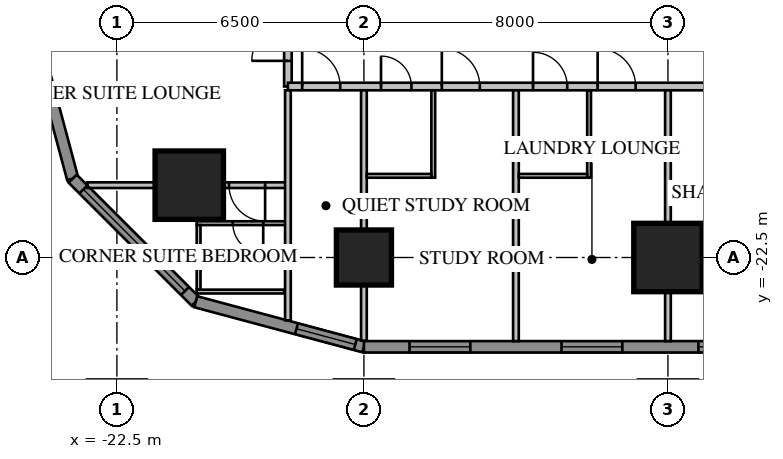
"""IFC4 building model, lengths in metres.
Left out: names, types, materials, properties, quantities, classifications, styles, units other than length and angle.
Written with IfcOpenShell. Run it as: python <this file> out.ifc"""

import sys

from ifc_helpers import new_model, si_unit, direction, frame, frame_2d, origin, origin_2d, place, context, subcontext, project, spatial, rectangle, extrude, element, fill, save


model = new_model("IFC4")
c1 = context("Model", 3, precision=1e-05, world=origin(), true_north=direction((0.0, 1.0)))
c2 = subcontext(c1, "Body", "Model", "MODEL_VIEW")
j1 = project(units=[si_unit("LENGTHUNIT", "METRE"), si_unit("PLANEANGLEUNIT", "RADIAN")], contexts=[c1])
p1 = place(None, origin())
s1 = spatial("IfcSite", under=j1, at=p1, CompositionType="ELEMENT")
p2 = place(p1, origin())
s2 = spatial("IfcBuilding", under=s1, at=p2, CompositionType="ELEMENT")
p3 = place(p2, frame((0.0, 0.0, 23.7)))
s3 = spatial("IfcBuildingStorey", under=s2, at=p3, CompositionType="ELEMENT", Elevation=23.7)
p4 = place(p3, frame((-20.596, -20.596, 0.0), z_axis=(0.0, 0.0, 1.0), x_axis=(1.0, 0.0, 0.0)))
e1 = element("IfcColumn", 1, at=p4, inside=s3, PredefinedType="COLUMN", context=c2, shape_type="SweptSolid", body=[
    extrude(rectangle(XDim=1.8, YDim=1.8, at=origin_2d()), origin(), (0.0, 0.0, 1.0), 3.85),
])
p5 = place(p3, frame((-16.0, -22.5, 0.0), z_axis=(0.0, 0.0, 1.0), x_axis=(1.0, 0.0, 0.0)))
e2 = element("IfcColumn", 2, at=p5, inside=s3, PredefinedType="COLUMN", context=c2, shape_type="SweptSolid", body=[
    extrude(rectangle(XDim=1.45, YDim=1.45, at=origin_2d()), origin(), (0.0, 0.0, 1.0), 3.85),
])
p6 = place(p3, frame((-8.0, -22.5, 0.0), z_axis=(0.0, 0.0, 1.0), x_axis=(1.0, 0.0, 0.0)))
e3 = element("IfcColumn", 3, at=p6, inside=s3, PredefinedType="COLUMN", context=c2, shape_type="SweptSolid", body=[
    extrude(rectangle(XDim=1.8, YDim=1.8, at=origin_2d()), origin(), (0.0, 0.0, 1.0), 3.85),
])
p7 = place(p3, frame((-24.85, -16.0, 0.0), z_axis=(0.0, 0.0, 1.0), x_axis=(0.258839972501, -0.965920218567, 0.0)))
e4 = element("IfcWall", 4, at=p7, inside=s3, PredefinedType="SOLIDWALL", context=c2, shape_type="SweptSolid", body=[
    extrude(rectangle(XDim=4.581, YDim=0.3, at=frame_2d((2.291, 0.0))), origin(), (0.0, 0.0, 1.0), 3.65),
])
p8 = place(p3, frame((-23.664, -20.425, 0.0), z_axis=(0.0, 0.0, 1.0), x_axis=(0.707106781187, -0.707106781187, 0.0)))
e5 = element("IfcWall", 5, at=p8, inside=s3, PredefinedType="SOLIDWALL", context=c2, shape_type="SweptSolid", body=[
    extrude(rectangle(XDim=4.581, YDim=0.3, at=frame_2d((2.291, 0.0))), origin(), (0.0, 0.0, 1.0), 3.65),
])
p9 = place(p8, frame((0.4, 0.0, 0.75)))
e6 = element("IfcOpeningElement", 6, at=p9, cuts=e5, PredefinedType="OPENING", context=c2, shape_type="SweptSolid", body=[
    extrude(rectangle(XDim=3.781, YDim=1.8, at=frame_2d((1.891, 0.9))), frame((0.0, 0.17, 0.0), z_axis=(0.0, -1.0, 0.0), x_axis=(1.0, 0.0, 0.0)), (0.0, 0.0, 1.0), 0.34),
])
p10 = place(p3, frame((-20.425, -23.664, 0.0), z_axis=(0.0, 0.0, 1.0), x_axis=(0.965920218567, -0.258839972501, 0.0)))
e7 = element("IfcWall", 7, at=p10, inside=s3, PredefinedType="SOLIDWALL", context=c2, shape_type="SweptSolid", body=[
    extrude(rectangle(XDim=4.581, YDim=0.3, at=frame_2d((2.291, 0.0))), origin(), (0.0, 0.0, 1.0), 3.65),
])
p11 = place(p10, frame((2.746, 0.0, 0.75)))
e8 = element("IfcOpeningElement", 8, at=p11, cuts=e7, PredefinedType="OPENING", context=c2, shape_type="SweptSolid", body=[
    extrude(rectangle(XDim=1.6, YDim=1.8, at=frame_2d((0.8, 0.9))), frame((0.0, 0.17, 0.0), z_axis=(0.0, -1.0, 0.0), x_axis=(1.0, 0.0, 0.0)), (0.0, 0.0, 1.0), 0.34),
])
p12 = place(p3, frame((-16.0, -24.85, 0.0), z_axis=(0.0, 0.0, 1.0), x_axis=(1.0, 0.0, 0.0)))
e9 = element("IfcWall", 9, at=p12, inside=s3, PredefinedType="SOLIDWALL", context=c2, shape_type="SweptSolid", body=[
    extrude(rectangle(XDim=32.0, YDim=0.3, at=frame_2d((16.0, 0.0))), origin(), (0.0, 0.0, 1.0), 3.65),
])
p13 = place(p12, frame((1.2, 0.0, 0.75)))
e10 = element("IfcOpeningElement", 10, at=p13, cuts=e9, PredefinedType="OPENING", context=c2, shape_type="SweptSolid", body=[
    extrude(rectangle(XDim=1.6, YDim=1.8, at=frame_2d((0.8, 0.9))), frame((0.0, 0.17, 0.0), z_axis=(0.0, -1.0, 0.0), x_axis=(1.0, 0.0, 0.0)), (0.0, 0.0, 1.0), 0.34),
])
p14 = place(p12, frame((5.2, 0.0, 0.75)))
e11 = element("IfcOpeningElement", 11, at=p14, cuts=e9, PredefinedType="OPENING", context=c2, shape_type="SweptSolid", body=[
    extrude(rectangle(XDim=1.6, YDim=1.8, at=frame_2d((0.8, 0.9))), frame((0.0, 0.17, 0.0), z_axis=(0.0, -1.0, 0.0), x_axis=(1.0, 0.0, 0.0)), (0.0, 0.0, 1.0), 0.34),
])
p15 = place(p12, frame((17.2, 0.0, 0.75)))
e12 = element("IfcOpeningElement", 12, at=p15, cuts=e9, PredefinedType="OPENING", context=c2, shape_type="SweptSolid", body=[
    extrude(rectangle(XDim=1.6, YDim=1.8, at=frame_2d((0.8, 0.9))), frame((0.0, 0.17, 0.0), z_axis=(0.0, -1.0, 0.0), x_axis=(1.0, 0.0, 0.0)), (0.0, 0.0, 1.0), 0.34),
])
p16 = place(p12, frame((21.2, 0.0, 0.75)))
e13 = element("IfcOpeningElement", 13, at=p16, cuts=e9, PredefinedType="OPENING", context=c2, shape_type="SweptSolid", body=[
    extrude(rectangle(XDim=1.6, YDim=1.8, at=frame_2d((0.8, 0.9))), frame((0.0, 0.17, 0.0), z_axis=(0.0, -1.0, 0.0), x_axis=(1.0, 0.0, 0.0)), (0.0, 0.0, 1.0), 0.34),
])
p17 = place(p12, frame((25.2, 0.0, 0.75)))
e14 = element("IfcOpeningElement", 14, at=p17, cuts=e9, PredefinedType="OPENING", context=c2, shape_type="SweptSolid", body=[
    extrude(rectangle(XDim=1.6, YDim=1.8, at=frame_2d((0.8, 0.9))), frame((0.0, 0.17, 0.0), z_axis=(0.0, -1.0, 0.0), x_axis=(1.0, 0.0, 0.0)), (0.0, 0.0, 1.0), 0.34),
])
p18 = place(p12, frame((29.2, 0.0, 0.75)))
e15 = element("IfcOpeningElement", 15, at=p18, cuts=e9, PredefinedType="OPENING", context=c2, shape_type="SweptSolid", body=[
    extrude(rectangle(XDim=1.6, YDim=1.8, at=frame_2d((0.8, 0.9))), frame((0.0, 0.17, 0.0), z_axis=(0.0, -1.0, 0.0), x_axis=(1.0, 0.0, 0.0)), (0.0, 0.0, 1.0), 0.34),
])
p19 = place(p12, frame((8.8, 0.0, 0.75)))
e16 = element("IfcOpeningElement", 16, at=p19, cuts=e9, PredefinedType="OPENING", context=c2, shape_type="SweptSolid", body=[
    extrude(rectangle(XDim=2.4, YDim=1.8, at=frame_2d((1.2, 0.9))), frame((0.0, 0.17, 0.0), z_axis=(0.0, -1.0, 0.0), x_axis=(1.0, 0.0, 0.0)), (0.0, 0.0, 1.0), 0.34),
])
p20 = place(p12, frame((13.812, 0.0, 0.0)))
e17 = element("IfcOpeningElement", 17, at=p20, cuts=e9, PredefinedType="OPENING", context=c2, shape_type="SweptSolid", body=[
    extrude(rectangle(XDim=1.0, YDim=2.4, at=frame_2d((0.5, 1.2))), frame((0.0, 0.17, 0.0), z_axis=(0.0, -1.0, 0.0), x_axis=(1.0, 0.0, 0.0)), (0.0, 0.0, 1.0), 0.34),
])
p21 = place(p3, frame((-18.0, 18.0, 0.0), z_axis=(0.0, 0.0, 1.0), x_axis=(0.0, -1.0, 0.0)))
e18 = element("IfcWall", 18, at=p21, inside=s3, PredefinedType="PARTITIONING", context=c2, shape_type="SweptSolid", body=[
    extrude(rectangle(XDim=36.0, YDim=0.2, at=frame_2d((18.0, 0.0))), origin(), (0.0, 0.0, 1.0), 3.65),
])
p22 = place(p21, frame((10.4, 0.0, 0.0)))
e19 = element("IfcOpeningElement", 19, at=p22, cuts=e18, PredefinedType="OPENING", context=c2, shape_type="SweptSolid", body=[
    extrude(rectangle(XDim=1.0, YDim=2.1, at=frame_2d((0.5, 1.05))), frame((0.0, 0.12, 0.0), z_axis=(0.0, -1.0, 0.0), x_axis=(1.0, 0.0, 0.0)), (0.0, 0.0, 1.0), 0.24),
])
p23 = place(p21, frame((14.4, 0.0, 0.0)))
e20 = element("IfcOpeningElement", 20, at=p23, cuts=e18, PredefinedType="OPENING", context=c2, shape_type="SweptSolid", body=[
    extrude(rectangle(XDim=1.0, YDim=2.1, at=frame_2d((0.5, 1.05))), frame((0.0, 0.12, 0.0), z_axis=(0.0, -1.0, 0.0), x_axis=(1.0, 0.0, 0.0)), (0.0, 0.0, 1.0), 0.24),
])
p24 = place(p21, frame((0.375, 0.0, 0.0)))
e21 = element("IfcOpeningElement", 21, at=p24, cuts=e18, PredefinedType="OPENING", context=c2, shape_type="SweptSolid", body=[
    extrude(rectangle(XDim=1.0, YDim=2.1, at=frame_2d((0.5, 1.05))), frame((0.0, 0.12, 0.0), z_axis=(0.0, -1.0, 0.0), x_axis=(1.0, 0.0, 0.0)), (0.0, 0.0, 1.0), 0.24),
])
p25 = place(p21, frame((34.375, 0.0, 0.0)))
e22 = element("IfcOpeningElement", 22, at=p25, cuts=e18, PredefinedType="OPENING", context=c2, shape_type="SweptSolid", body=[
    extrude(rectangle(XDim=0.95, YDim=2.1, at=frame_2d((0.475, 1.05))), frame((0.0, 0.12, 0.0), z_axis=(0.0, -1.0, 0.0), x_axis=(1.0, 0.0, 0.0)), (0.0, 0.0, 1.0), 0.24),
])
p26 = place(p3, frame((-18.065, -21.596, 0.0), z_axis=(0.0, 0.0, 1.0), x_axis=(-1.0, 0.0, 0.0)))
e23 = element("IfcWall", 23, at=p26, inside=s3, PredefinedType="PARTITIONING", context=c2, shape_type="SweptSolid", body=[
    extrude(rectangle(XDim=2.335, YDim=0.1, at=frame_2d((1.167, 0.0))), origin(), (0.0, 0.0, 1.0), 3.65),
])
p27 = place(p26, frame((0.585, 0.0, 0.0)))
e24 = element("IfcOpeningElement", 24, at=p27, cuts=e23, PredefinedType="OPENING", context=c2, shape_type="SweptSolid", body=[
    extrude(rectangle(XDim=0.8, YDim=2.1, at=frame_2d((0.4, 1.05))), frame((0.0, 0.07, 0.0), z_axis=(0.0, -1.0, 0.0), x_axis=(1.0, 0.0, 0.0)), (0.0, 0.0, 1.0), 0.14),
])
p28 = place(p3, frame((-20.35, -21.646, 0.0), z_axis=(0.0, 0.0, 1.0), x_axis=(0.0, -1.0, 0.0)))
e25 = element("IfcWall", 25, at=p28, inside=s3, PredefinedType="PARTITIONING", context=c2, shape_type="SweptSolid", body=[
    extrude(rectangle(XDim=1.7, YDim=0.1, at=frame_2d((0.85, 0.0))), origin(), (0.0, 0.0, 1.0), 3.65),
])
p29 = place(p3, frame((-18.1, -23.396, 0.0), z_axis=(0.0, 0.0, 1.0), x_axis=(-1.0, 0.0, 0.0)))
e26 = element("IfcWall", 26, at=p29, inside=s3, PredefinedType="PARTITIONING", context=c2, shape_type="SweptSolid", body=[
    extrude(rectangle(XDim=2.3, YDim=0.1, at=frame_2d((1.15, 0.0))), origin(), (0.0, 0.0, 1.0), 3.65),
])
p30 = place(p3, frame((-18.065, -20.596, 0.0), z_axis=(0.0, 0.0, 1.0), x_axis=(-1.0, 0.0, 0.0)))
e27 = element("IfcWall", 27, at=p30, inside=s3, PredefinedType="PARTITIONING", context=c2, shape_type="SweptSolid", body=[
    extrude(rectangle(XDim=5.209, YDim=0.15, at=frame_2d((2.604, 0.0))), origin(), (0.0, 0.0, 1.0), 3.65),
])
p31 = place(p30, frame((0.535, 0.0, 0.0)))
e28 = element("IfcOpeningElement", 28, at=p31, cuts=e27, PredefinedType="OPENING", context=c2, shape_type="SweptSolid", body=[
    extrude(rectangle(XDim=0.95, YDim=2.1, at=frame_2d((0.475, 1.05))), frame((0.0, 0.095, 0.0), z_axis=(0.0, -1.0, 0.0), x_axis=(1.0, 0.0, 0.0)), (0.0, 0.0, 1.0), 0.19),
])
p32 = place(p3, frame((-18.0, -18.0, 0.0), z_axis=(0.0, 0.0, 1.0), x_axis=(1.0, 0.0, 0.0)))
e29 = element("IfcWall", 29, at=p32, inside=s3, PredefinedType="PARTITIONING", context=c2, shape_type="SweptSolid", body=[
    extrude(rectangle(XDim=36.0, YDim=0.2, at=frame_2d((18.0, 0.0))), origin(), (0.0, 0.0, 1.0), 3.65),
])
p33 = place(p32, frame((0.375, 0.0, 0.0)))
e30 = element("IfcOpeningElement", 30, at=p33, cuts=e29, PredefinedType="OPENING", context=c2, shape_type="SweptSolid", body=[
    extrude(rectangle(XDim=1.0, YDim=2.1, at=frame_2d((0.5, 1.05))), frame((0.0, 0.12, 0.0), z_axis=(0.0, -1.0, 0.0), x_axis=(1.0, 0.0, 0.0)), (0.0, 0.0, 1.0), 0.24),
])
p34 = place(p32, frame((2.45, 0.0, 0.0)))
e31 = element("IfcOpeningElement", 31, at=p34, cuts=e29, PredefinedType="OPENING", context=c2, shape_type="SweptSolid", body=[
    extrude(rectangle(XDim=0.8, YDim=2.1, at=frame_2d((0.4, 1.05))), frame((0.0, 0.12, 0.0), z_axis=(0.0, -1.0, 0.0), x_axis=(1.0, 0.0, 0.0)), (0.0, 0.0, 1.0), 0.24),
])
p35 = place(p32, frame((4.05, 0.0, 0.0)))
e32 = element("IfcOpeningElement", 32, at=p35, cuts=e29, PredefinedType="OPENING", context=c2, shape_type="SweptSolid", body=[
    extrude(rectangle(XDim=1.0, YDim=2.1, at=frame_2d((0.5, 1.05))), frame((0.0, 0.12, 0.0), z_axis=(0.0, -1.0, 0.0), x_axis=(1.0, 0.0, 0.0)), (0.0, 0.0, 1.0), 0.24),
])
p36 = place(p32, frame((6.45, 0.0, 0.0)))
e33 = element("IfcOpeningElement", 33, at=p36, cuts=e29, PredefinedType="OPENING", context=c2, shape_type="SweptSolid", body=[
    extrude(rectangle(XDim=0.9, YDim=2.1, at=frame_2d((0.45, 1.05))), frame((0.0, 0.12, 0.0), z_axis=(0.0, -1.0, 0.0), x_axis=(1.0, 0.0, 0.0)), (0.0, 0.0, 1.0), 0.24),
])
p37 = place(p32, frame((8.15, 0.0, 0.0)))
e34 = element("IfcOpeningElement", 34, at=p37, cuts=e29, PredefinedType="OPENING", context=c2, shape_type="SweptSolid", body=[
    extrude(rectangle(XDim=1.0, YDim=2.1, at=frame_2d((0.5, 1.05))), frame((0.0, 0.12, 0.0), z_axis=(0.0, -1.0, 0.0), x_axis=(1.0, 0.0, 0.0)), (0.0, 0.0, 1.0), 0.24),
])
p38 = place(p32, frame((19.8, 0.0, 0.0)))
e35 = element("IfcOpeningElement", 35, at=p38, cuts=e29, PredefinedType="OPENING", context=c2, shape_type="SweptSolid", body=[
    extrude(rectangle(XDim=0.95, YDim=2.1, at=frame_2d((0.475, 1.05))), frame((0.0, 0.12, 0.0), z_axis=(0.0, -1.0, 0.0), x_axis=(1.0, 0.0, 0.0)), (0.0, 0.0, 1.0), 0.24),
])
p39 = place(p32, frame((23.8, 0.0, 0.0)))
e36 = element("IfcOpeningElement", 36, at=p39, cuts=e29, PredefinedType="OPENING", context=c2, shape_type="SweptSolid", body=[
    extrude(rectangle(XDim=0.95, YDim=2.1, at=frame_2d((0.475, 1.05))), frame((0.0, 0.12, 0.0), z_axis=(0.0, -1.0, 0.0), x_axis=(1.0, 0.0, 0.0)), (0.0, 0.0, 1.0), 0.24),
])
p40 = place(p32, frame((27.8, 0.0, 0.0)))
e37 = element("IfcOpeningElement", 37, at=p40, cuts=e29, PredefinedType="OPENING", context=c2, shape_type="SweptSolid", body=[
    extrude(rectangle(XDim=0.95, YDim=2.1, at=frame_2d((0.475, 1.05))), frame((0.0, 0.12, 0.0), z_axis=(0.0, -1.0, 0.0), x_axis=(1.0, 0.0, 0.0)), (0.0, 0.0, 1.0), 0.24),
])
p41 = place(p32, frame((31.8, 0.0, 0.0)))
e38 = element("IfcOpeningElement", 38, at=p41, cuts=e29, PredefinedType="OPENING", context=c2, shape_type="SweptSolid", body=[
    extrude(rectangle(XDim=0.95, YDim=2.1, at=frame_2d((0.475, 1.05))), frame((0.0, 0.12, 0.0), z_axis=(0.0, -1.0, 0.0), x_axis=(1.0, 0.0, 0.0)), (0.0, 0.0, 1.0), 0.24),
])
p42 = place(p32, frame((34.375, 0.0, 0.0)))
e39 = element("IfcOpeningElement", 39, at=p42, cuts=e29, PredefinedType="OPENING", context=c2, shape_type="SweptSolid", body=[
    extrude(rectangle(XDim=0.95, YDim=2.1, at=frame_2d((0.475, 1.05))), frame((0.0, 0.12, 0.0), z_axis=(0.0, -1.0, 0.0), x_axis=(1.0, 0.0, 0.0)), (0.0, 0.0, 1.0), 0.24),
])
p43 = place(p32, frame((11.2, 0.0, 0.0)))
e40 = element("IfcOpeningElement", 40, at=p43, cuts=e29, PredefinedType="OPENING", context=c2, shape_type="SweptSolid", body=[
    extrude(rectangle(XDim=1.0, YDim=2.1, at=frame_2d((0.5, 1.05))), frame((0.0, 0.12, 0.0), z_axis=(0.0, -1.0, 0.0), x_axis=(1.0, 0.0, 0.0)), (0.0, 0.0, 1.0), 0.24),
])
p44 = place(p3, frame((-18.0, -18.1, 0.0), z_axis=(0.0, 0.0, 1.0), x_axis=(0.0, -1.0, 0.0)))
e41 = element("IfcWall", 41, at=p44, inside=s3, PredefinedType="PARTITIONING", context=c2, shape_type="SweptSolid", body=[
    extrude(rectangle(XDim=6.053, YDim=0.15, at=frame_2d((3.027, 0.0))), origin(), (0.0, 0.0, 1.0), 3.65),
])
p45 = place(p3, frame((-16.0, -18.1, 0.0), z_axis=(0.0, 0.0, 1.0), x_axis=(0.0, -1.0, 0.0)))
e42 = element("IfcWall", 42, at=p45, inside=s3, PredefinedType="PARTITIONING", context=c2, shape_type="SweptSolid", body=[
    extrude(rectangle(XDim=6.589, YDim=0.15, at=frame_2d((3.295, 0.0))), origin(), (0.0, 0.0, 1.0), 3.65),
])
for number, where, z_axis, x_axis in (
    (43, (-12.0, -18.1, 0.0), (0.0, 0.0, 1.0), (0.0, -1.0, 0.0)),
    (44, (-8.0, -18.1, 0.0), (0.0, 0.0, 1.0), (0.0, -1.0, 0.0)),
):
    element("IfcWall", number, at=place(p3, frame(where, z_axis=z_axis, x_axis=x_axis)), inside=s3, PredefinedType="PARTITIONING", context=c2, shape_type="SweptSolid", body=[
        extrude(rectangle(XDim=6.6, YDim=0.15, at=frame_2d((3.3, 0.0))), origin(), (0.0, 0.0, 1.0), 3.65),
    ])
p46 = place(p3, frame((-14.175, -18.1, 0.0), z_axis=(0.0, 0.0, 1.0), x_axis=(0.0, -1.0, 0.0)))
e45 = element("IfcWall", 45, at=p46, inside=s3, PredefinedType="PARTITIONING", context=c2, shape_type="SweptSolid", body=[
    extrude(rectangle(XDim=2.3, YDim=0.1, at=frame_2d((1.15, 0.0))), origin(), (0.0, 0.0, 1.0), 3.65),
])
p47 = place(p3, frame((-15.925, -20.35, 0.0), z_axis=(0.0, 0.0, 1.0), x_axis=(1.0, 0.0, 0.0)))
e46 = element("IfcWall", 46, at=p47, inside=s3, PredefinedType="PARTITIONING", context=c2, shape_type="SweptSolid", body=[
    extrude(rectangle(XDim=1.7, YDim=0.1, at=frame_2d((0.85, 0.0))), origin(), (0.0, 0.0, 1.0), 3.65),
])
p48 = place(p3, frame((-10.075, -18.1, 0.0), z_axis=(0.0, 0.0, 1.0), x_axis=(0.0, -1.0, 0.0)))
e47 = element("IfcWall", 47, at=p48, inside=s3, PredefinedType="PARTITIONING", context=c2, shape_type="SweptSolid", body=[
    extrude(rectangle(XDim=2.3, YDim=0.1, at=frame_2d((1.15, 0.0))), origin(), (0.0, 0.0, 1.0), 3.65),
])
p49 = place(p3, frame((-11.925, -20.35, 0.0), z_axis=(0.0, 0.0, 1.0), x_axis=(1.0, 0.0, 0.0)))
e48 = element("IfcWall", 48, at=p49, inside=s3, PredefinedType="PARTITIONING", context=c2, shape_type="SweptSolid", body=[
    extrude(rectangle(XDim=1.8, YDim=0.1, at=frame_2d((0.9, 0.0))), origin(), (0.0, 0.0, 1.0), 3.65),
])
p50 = place(p9, origin())
e49 = element("IfcWindow", 49, at=p50, inside=s3, PartitioningType="SINGLE_PANEL", PredefinedType="WINDOW", context=c2, shape_type="SweptSolid", body=[
    extrude(rectangle(XDim=3.781, YDim=1.8, at=frame_2d((1.891, 0.9))), frame((0.0, 0.03, 0.0), z_axis=(0.0, -1.0, 0.0), x_axis=(1.0, 0.0, 0.0)), (0.0, 0.0, 1.0), 0.06),
])
fill(e6, e49)
p51 = place(p11, origin())
e50 = element("IfcWindow", 50, at=p51, inside=s3, PartitioningType="SINGLE_PANEL", PredefinedType="WINDOW", context=c2, shape_type="SweptSolid", body=[
    extrude(rectangle(XDim=1.6, YDim=1.8, at=frame_2d((0.8, 0.9))), frame((0.0, 0.03, 0.0), z_axis=(0.0, -1.0, 0.0), x_axis=(1.0, 0.0, 0.0)), (0.0, 0.0, 1.0), 0.06),
])
fill(e8, e50)
p52 = place(p13, origin())
e51 = element("IfcWindow", 51, at=p52, inside=s3, PartitioningType="SINGLE_PANEL", PredefinedType="WINDOW", context=c2, shape_type="SweptSolid", body=[
    extrude(rectangle(XDim=1.6, YDim=1.8, at=frame_2d((0.8, 0.9))), frame((0.0, 0.03, 0.0), z_axis=(0.0, -1.0, 0.0), x_axis=(1.0, 0.0, 0.0)), (0.0, 0.0, 1.0), 0.06),
])
fill(e10, e51)
p53 = place(p14, origin())
e52 = element("IfcWindow", 52, at=p53, inside=s3, PartitioningType="SINGLE_PANEL", PredefinedType="WINDOW", context=c2, shape_type="SweptSolid", body=[
    extrude(rectangle(XDim=1.6, YDim=1.8, at=frame_2d((0.8, 0.9))), frame((0.0, 0.03, 0.0), z_axis=(0.0, -1.0, 0.0), x_axis=(1.0, 0.0, 0.0)), (0.0, 0.0, 1.0), 0.06),
])
fill(e11, e52)
p54 = place(p19, origin())
e53 = element("IfcWindow", 53, at=p54, inside=s3, PartitioningType="SINGLE_PANEL", PredefinedType="WINDOW", context=c2, shape_type="SweptSolid", body=[
    extrude(rectangle(XDim=2.4, YDim=1.8, at=frame_2d((1.2, 0.9))), frame((0.0, 0.03, 0.0), z_axis=(0.0, -1.0, 0.0), x_axis=(1.0, 0.0, 0.0)), (0.0, 0.0, 1.0), 0.06),
])
fill(e16, e53)
p55 = place(p25, origin())
e54 = element("IfcDoor", 54, at=p55, inside=s3, OperationType="SINGLE_SWING_RIGHT", PredefinedType="DOOR", context=c2, shape_type="SweptSolid", body=[
    extrude(rectangle(XDim=0.95, YDim=2.1, at=frame_2d((0.475, 1.05))), frame((0.0, 0.025, 0.0), z_axis=(0.0, -1.0, 0.0), x_axis=(1.0, 0.0, 0.0)), (0.0, 0.0, 1.0), 0.05),
])
fill(e22, e54)
p56 = place(p27, origin())
e55 = element("IfcDoor", 55, at=p56, inside=s3, OperationType="SINGLE_SWING_LEFT", PredefinedType="DOOR", context=c2, shape_type="SweptSolid", body=[
    extrude(rectangle(XDim=0.8, YDim=2.1, at=frame_2d((0.4, 1.05))), frame((0.0, 0.025, 0.0), z_axis=(0.0, -1.0, 0.0), x_axis=(1.0, 0.0, 0.0)), (0.0, 0.0, 1.0), 0.05),
])
fill(e24, e55)
p57 = place(p31, origin())
e56 = element("IfcDoor", 56, at=p57, inside=s3, OperationType="SINGLE_SWING_LEFT", PredefinedType="DOOR", context=c2, shape_type="SweptSolid", body=[
    extrude(rectangle(XDim=0.95, YDim=2.1, at=frame_2d((0.475, 1.05))), frame((0.0, 0.025, 0.0), z_axis=(0.0, -1.0, 0.0), x_axis=(1.0, 0.0, 0.0)), (0.0, 0.0, 1.0), 0.05),
])
fill(e28, e56)
p58 = place(p33, origin())
e57 = element("IfcDoor", 57, at=p58, inside=s3, OperationType="SINGLE_SWING_LEFT", PredefinedType="DOOR", context=c2, shape_type="SweptSolid", body=[
    extrude(rectangle(XDim=1.0, YDim=2.1, at=frame_2d((0.5, 1.05))), frame((0.0, 0.025, 0.0), z_axis=(0.0, -1.0, 0.0), x_axis=(1.0, 0.0, 0.0)), (0.0, 0.0, 1.0), 0.05),
])
fill(e30, e57)
p59 = place(p34, origin())
e58 = element("IfcDoor", 58, at=p59, inside=s3, OperationType="SINGLE_SWING_LEFT", PredefinedType="DOOR", context=c2, shape_type="SweptSolid", body=[
    extrude(rectangle(XDim=0.8, YDim=2.1, at=frame_2d((0.4, 1.05))), frame((0.0, 0.025, 0.0), z_axis=(0.0, -1.0, 0.0), x_axis=(1.0, 0.0, 0.0)), (0.0, 0.0, 1.0), 0.05),
])
fill(e31, e58)
p60 = place(p35, origin())
e59 = element("IfcDoor", 59, at=p60, inside=s3, OperationType="SINGLE_SWING_LEFT", PredefinedType="DOOR", context=c2, shape_type="SweptSolid", body=[
    extrude(rectangle(XDim=1.0, YDim=2.1, at=frame_2d((0.5, 1.05))), frame((0.0, 0.025, 0.0), z_axis=(0.0, -1.0, 0.0), x_axis=(1.0, 0.0, 0.0)), (0.0, 0.0, 1.0), 0.05),
])
fill(e32, e59)
p61 = place(p36, origin())
e60 = element("IfcDoor", 60, at=p61, inside=s3, OperationType="SINGLE_SWING_LEFT", PredefinedType="DOOR", context=c2, shape_type="SweptSolid", body=[
    extrude(rectangle(XDim=0.9, YDim=2.1, at=frame_2d((0.45, 1.05))), frame((0.0, 0.025, 0.0), z_axis=(0.0, -1.0, 0.0), x_axis=(1.0, 0.0, 0.0)), (0.0, 0.0, 1.0), 0.05),
])
fill(e33, e60)
p62 = place(p37, origin())
e61 = element("IfcDoor", 61, at=p62, inside=s3, OperationType="SINGLE_SWING_LEFT", PredefinedType="DOOR", context=c2, shape_type="SweptSolid", body=[
    extrude(rectangle(XDim=1.0, YDim=2.1, at=frame_2d((0.5, 1.05))), frame((0.0, 0.025, 0.0), z_axis=(0.0, -1.0, 0.0), x_axis=(1.0, 0.0, 0.0)), (0.0, 0.0, 1.0), 0.05),
])
fill(e34, e61)
save(model, sys.argv[1])
